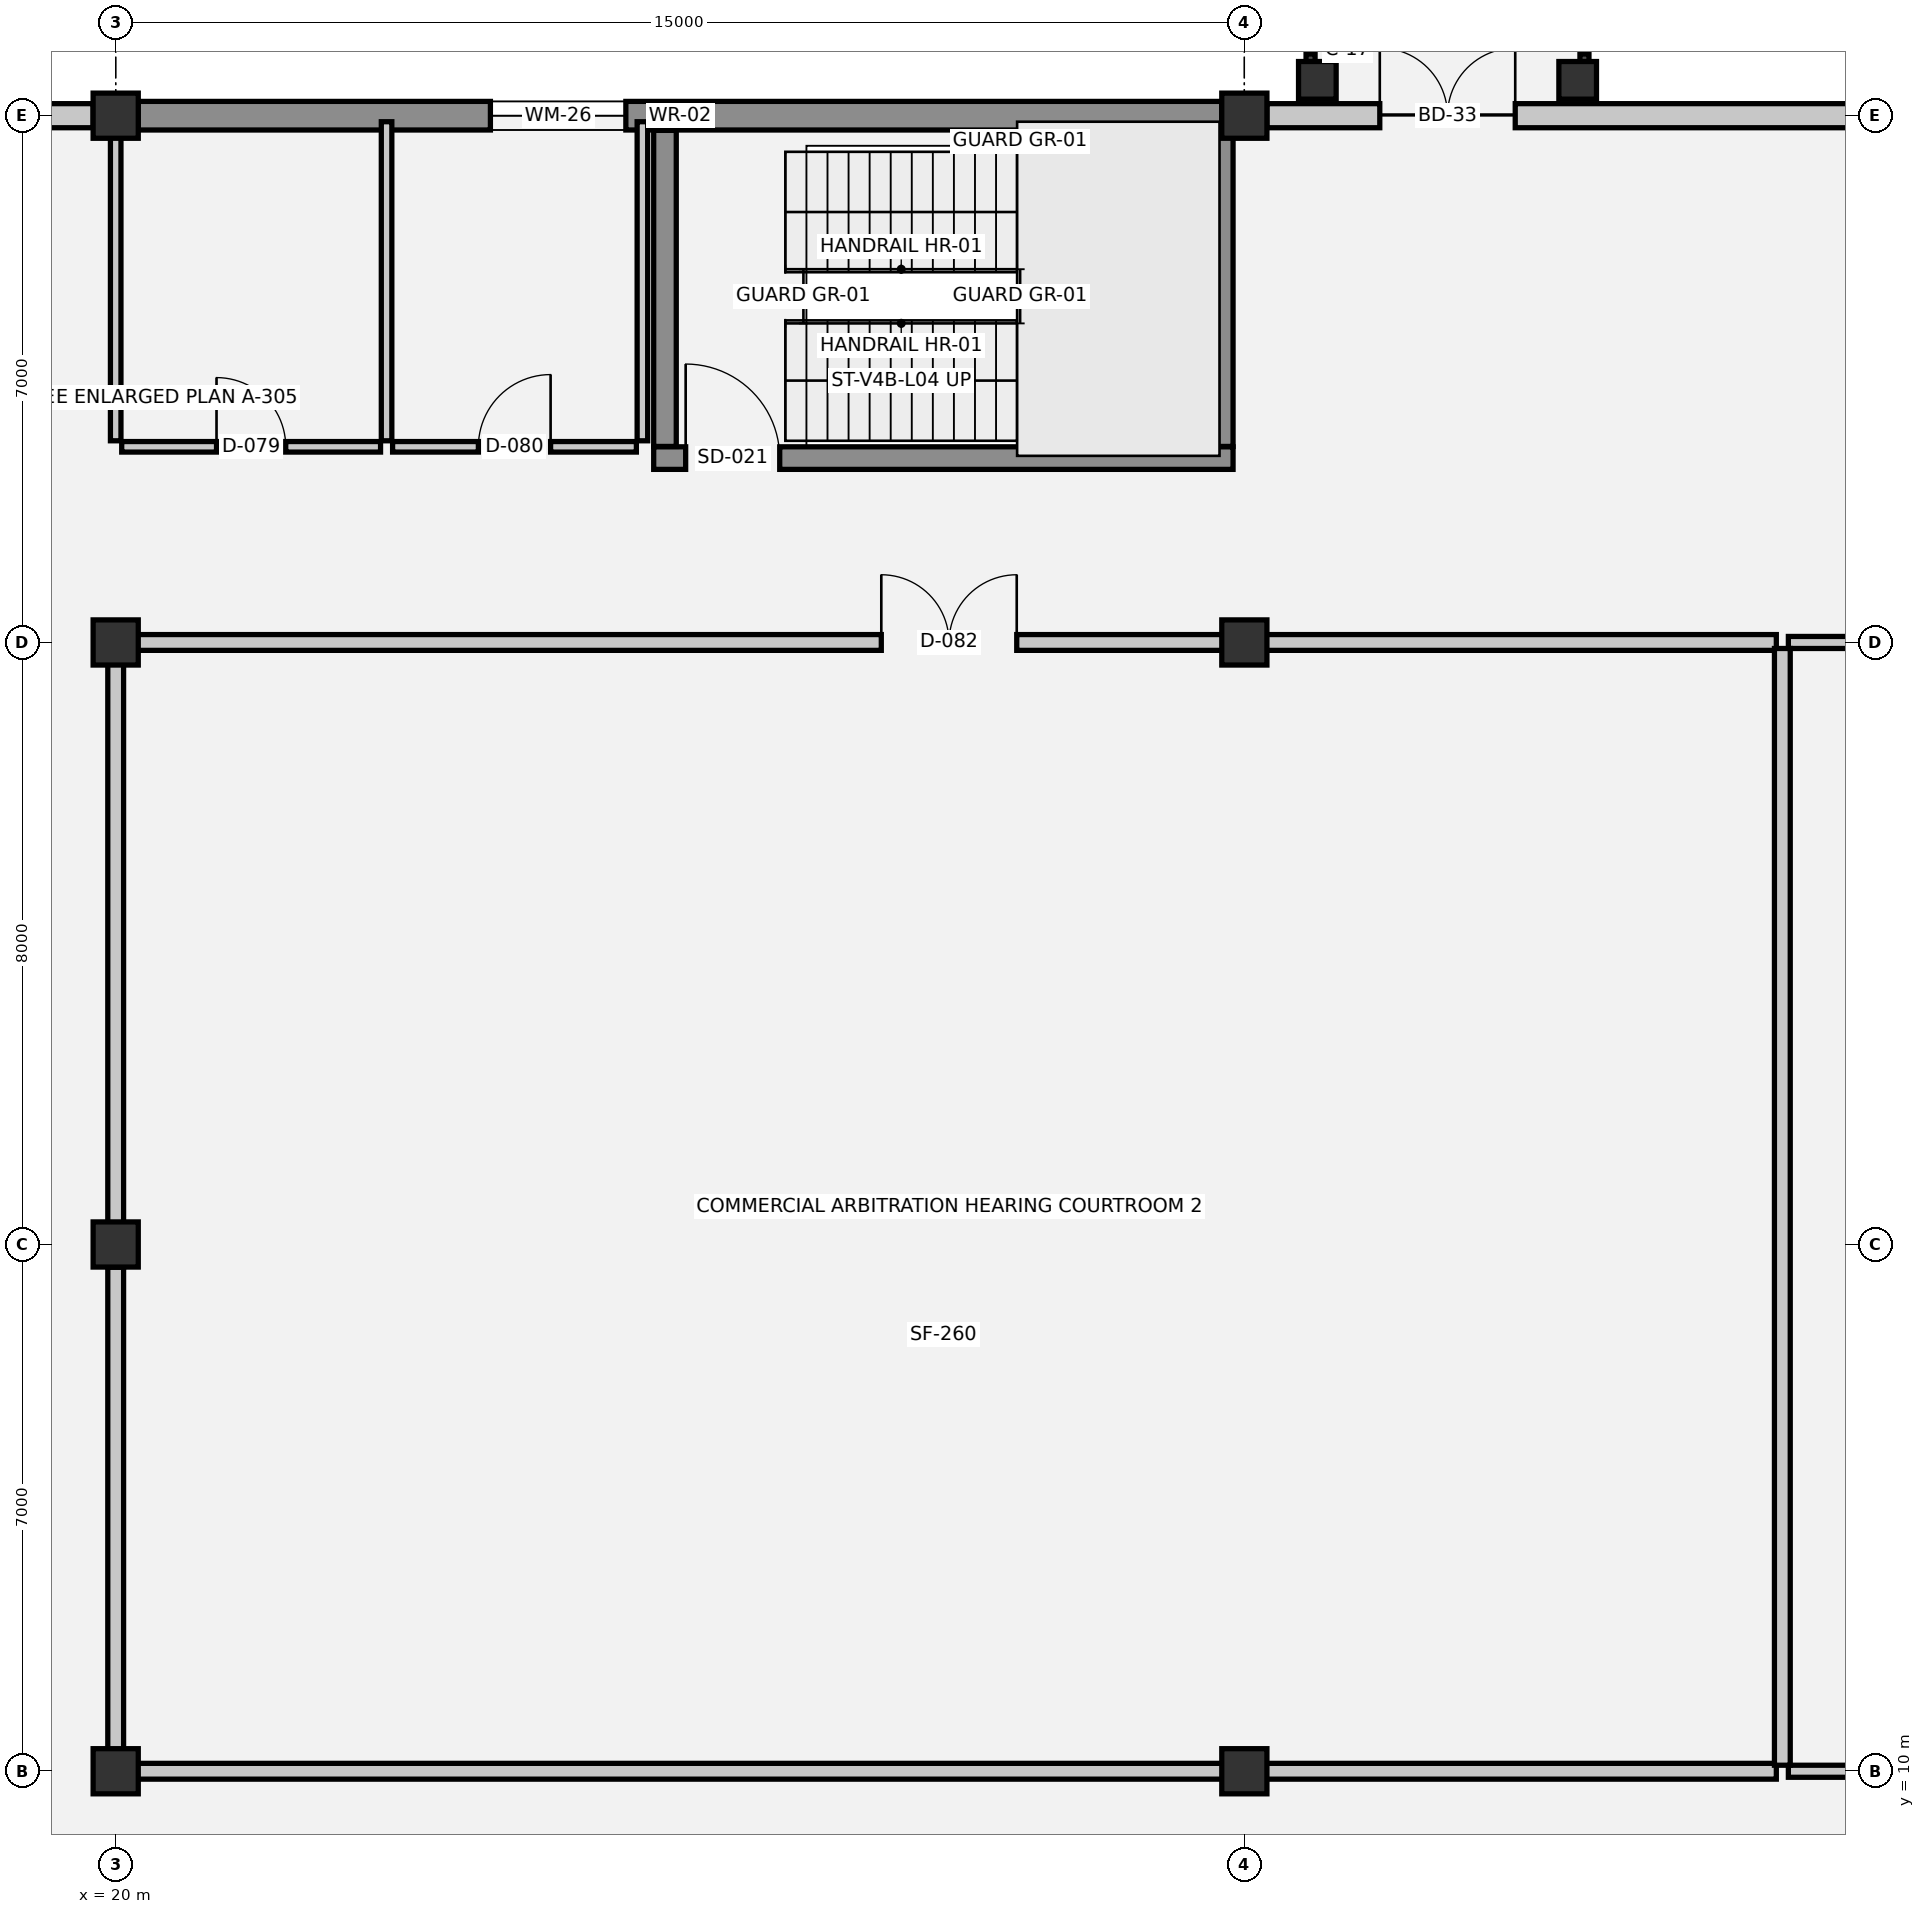
"""IFC4 building model, lengths in metres.
Left out: names, types, materials, properties, quantities, classifications, styles, units other than length and angle.
Written with IfcOpenShell. Run it as: python <this file> out.ifc"""

import sys

from ifc_helpers import new_model, si_unit, direction, frame, frame_2d, origin, origin_2d, place, context, subcontext, project, spatial, rectangle, extrude, element, fill, save


model = new_model("IFC4")
c1 = context("Model", 3, precision=1e-05, world=origin(), true_north=direction((0.0, 1.0)))
c2 = subcontext(c1, "Body", "Model", "MODEL_VIEW")
j1 = project(units=[si_unit("LENGTHUNIT", "METRE"), si_unit("PLANEANGLEUNIT", "RADIAN")], contexts=[c1])
p1 = place(None, origin())
s1 = spatial("IfcSite", under=j1, at=p1, CompositionType="ELEMENT")
p2 = place(p1, origin())
s2 = spatial("IfcBuilding", under=s1, at=p2, CompositionType="ELEMENT")
p3 = place(p2, frame((0.0, 0.0, 14.4)))
s3 = spatial("IfcBuildingStorey", under=s2, at=p3, CompositionType="ELEMENT", Elevation=14.4)
for number, where, z_axis, x_axis in (
    (1, (20.0, 10.0, 0.0), (0.0, 0.0, 1.0), (1.0, 0.0, 0.0)),
    (2, (20.0, 17.0, 0.0), (0.0, 0.0, 1.0), (1.0, 0.0, 0.0)),
    (3, (20.0, 25.0, 0.0), (0.0, 0.0, 1.0), (1.0, 0.0, 0.0)),
    (4, (20.0, 32.0, 0.0), (0.0, 0.0, 1.0), (1.0, 0.0, 0.0)),
    (5, (35.0, 10.0, 0.0), (0.0, 0.0, 1.0), (1.0, 0.0, 0.0)),
    (6, (35.0, 25.0, 0.0), (0.0, 0.0, 1.0), (1.0, 0.0, 0.0)),
    (7, (35.0, 32.0, 0.0), (0.0, 0.0, 1.0), (1.0, 0.0, 0.0)),
):
    element("IfcColumn", number, at=place(p3, frame(where, z_axis=z_axis, x_axis=x_axis)), inside=s3, PredefinedType="COLUMN", context=c2, shape_type="SweptSolid", body=[
        extrude(rectangle(XDim=0.6, YDim=0.6, at=origin_2d()), origin(), (0.0, 0.0, 1.0), 3.9),
    ])
for number, where, z_axis, x_axis in (
    (8, (35.97, 32.47, 0.0), (0.0, 0.0, 1.0), (1.0, 0.0, 0.0)),
    (9, (39.43, 32.47, 0.0), (0.0, 0.0, 1.0), (1.0, 0.0, 0.0)),
):
    element("IfcColumn", number, at=place(p3, frame(where, z_axis=z_axis, x_axis=x_axis)), inside=s3, PredefinedType="COLUMN", context=c2, shape_type="SweptSolid", body=[
        extrude(rectangle(XDim=0.5, YDim=0.5, at=origin_2d()), origin(), (0.0, 0.0, 1.0), 3.67),
    ])
p4 = place(p3, frame((14.8, 32.0, 0.0), z_axis=(0.0, 0.0, 1.0), x_axis=(1.0, 0.0, 0.0)))
e10 = element("IfcWall", 10, at=p4, inside=s3, PredefinedType="SOLIDWALL", context=c2, shape_type="SweptSolid", body=[
    extrude(rectangle(XDim=4.9, YDim=0.32, at=frame_2d((2.45, 0.0))), origin(), (0.0, 0.0, 1.0), 2.61),
])
p5 = place(p4, frame((1.35, 0.0, 0.9)))
e11 = element("IfcOpeningElement", 11, at=p5, cuts=e10, PredefinedType="OPENING", context=c2, shape_type="SweptSolid", body=[
    extrude(rectangle(XDim=2.2, YDim=1.0, at=frame_2d((1.1, 0.5))), frame((0.0, 0.17, 0.0), z_axis=(0.0, -1.0, 0.0), x_axis=(1.0, 0.0, 0.0)), (0.0, 0.0, 1.0), 0.34),
])
p6 = place(p3, frame((20.3, 32.0, 0.0), z_axis=(0.0, 0.0, 1.0), x_axis=(1.0, 0.0, 0.0)))
e12 = element("IfcWall", 12, at=p6, inside=s3, PredefinedType="STANDARD", context=c2, shape_type="SweptSolid", body=[
    extrude(rectangle(XDim=14.4, YDim=0.38, at=frame_2d((7.2, 0.0))), origin(), (0.0, 0.0, 1.0), 2.61),
])
p7 = place(p6, frame((4.68, 0.0, 0.95)))
e13 = element("IfcOpeningElement", 13, at=p7, cuts=e12, PredefinedType="OPENING", context=c2, shape_type="SweptSolid", body=[
    extrude(rectangle(XDim=1.8, YDim=1.35, at=frame_2d((0.9, 0.675))), frame((0.0, 0.2, 0.0), z_axis=(0.0, -1.0, 0.0), x_axis=(1.0, 0.0, 0.0)), (0.0, 0.0, 1.0), 0.4),
])
p8 = place(p3, frame((35.3, 32.0, 0.0), z_axis=(0.0, 0.0, 1.0), x_axis=(1.0, 0.0, 0.0)))
e14 = element("IfcWall", 14, at=p8, inside=s3, PredefinedType="SOLIDWALL", context=c2, shape_type="SweptSolid", body=[
    extrude(rectangle(XDim=14.4, YDim=0.32, at=frame_2d((7.2, 0.0))), origin(), (0.0, 0.0, 1.0), 2.61),
])
p9 = place(p8, frame((1.5, 0.0, 0.0)))
e15 = element("IfcOpeningElement", 15, at=p9, cuts=e14, PredefinedType="OPENING", context=c2, shape_type="SweptSolid", body=[
    extrude(rectangle(XDim=1.8, YDim=2.25, at=frame_2d((0.9, 1.125))), frame((0.0, 0.17, 0.0), z_axis=(0.0, -1.0, 0.0), x_axis=(1.0, 0.0, 0.0)), (0.0, 0.0, 1.0), 0.34),
])
p10 = place(p3, frame((27.15, 27.45, 0.0), z_axis=(0.0, 0.0, 1.0), x_axis=(1.0, 0.0, 0.0)))
e16 = element("IfcWall", 16, at=p10, inside=s3, PredefinedType="SHEAR", context=c2, shape_type="SweptSolid", body=[
    extrude(rectangle(XDim=7.7, YDim=0.3, at=frame_2d((3.85, 0.0))), origin(), (0.0, 0.0, 1.0), 3.64),
])
p11 = place(p10, frame((0.425, 0.0, 0.0)))
e17 = element("IfcOpeningElement", 17, at=p11, cuts=e16, PredefinedType="OPENING", context=c2, shape_type="SweptSolid", body=[
    extrude(rectangle(XDim=1.25, YDim=2.15, at=frame_2d((0.625, 1.075))), frame((0.0, 0.16, 0.0), z_axis=(0.0, -1.0, 0.0), x_axis=(1.0, 0.0, 0.0)), (0.0, 0.0, 1.0), 0.32),
])
for number, where, z_axis, x_axis in (
    (18, (27.3, 31.805, 0.0), (0.0, 0.0, 1.0), (0.0, -1.0, 0.0)),
    (19, (34.7, 27.605, 0.0), (0.0, 0.0, 1.0), (0.0, 1.0, 0.0)),
):
    element("IfcWall", number, at=place(p3, frame(where, z_axis=z_axis, x_axis=x_axis)), inside=s3, PredefinedType="SHEAR", context=c2, shape_type="SweptSolid", body=[
        extrude(rectangle(XDim=4.2, YDim=0.3, at=frame_2d((2.1, 0.0))), origin(), (0.0, 0.0, 1.0), 3.64),
    ])
p12 = place(p3, frame((20.08, 10.0, 0.0), z_axis=(0.0, 0.0, 1.0), x_axis=(1.0, 0.0, 0.0)))
e20 = element("IfcWall", 20, at=p12, inside=s3, PredefinedType="PARTITIONING", context=c2, shape_type="SweptSolid", body=[
    extrude(rectangle(XDim=21.99, YDim=0.21, at=frame_2d((10.995, 0.0))), origin(), (0.0, 0.0, 1.0), 2.63),
])
p13 = place(p3, frame((42.23, 10.0, 0.0), z_axis=(0.0, 0.0, 1.0), x_axis=(1.0, 0.0, 0.0)))
e21 = element("IfcWall", 21, at=p13, inside=s3, PredefinedType="PARTITIONING", context=c2, shape_type="SweptSolid", body=[
    extrude(rectangle(XDim=8.07, YDim=0.16, at=frame_2d((4.035, 0.0))), origin(), (0.0, 0.0, 1.0), 2.63),
])
p14 = place(p3, frame((20.08, 25.0, 0.0), z_axis=(0.0, 0.0, 1.0), x_axis=(1.0, 0.0, 0.0)))
e22 = element("IfcWall", 22, at=p14, inside=s3, PredefinedType="PARTITIONING", context=c2, shape_type="SweptSolid", body=[
    extrude(rectangle(XDim=21.99, YDim=0.21, at=frame_2d((10.995, 0.0))), origin(), (0.0, 0.0, 1.0), 2.63),
])
p15 = place(p14, frame((10.095, 0.0, 0.0)))
e23 = element("IfcOpeningElement", 23, at=p15, cuts=e22, PredefinedType="OPENING", context=c2, shape_type="SweptSolid", body=[
    extrude(rectangle(XDim=1.8, YDim=2.3, at=frame_2d((0.9, 1.15))), frame((0.0, 0.115, 0.0), z_axis=(0.0, -1.0, 0.0), x_axis=(1.0, 0.0, 0.0)), (0.0, 0.0, 1.0), 0.23),
])
p16 = place(p3, frame((42.23, 25.0, 0.0), z_axis=(0.0, 0.0, 1.0), x_axis=(1.0, 0.0, 0.0)))
e24 = element("IfcWall", 24, at=p16, inside=s3, PredefinedType="PARTITIONING", context=c2, shape_type="SweptSolid", body=[
    extrude(rectangle(XDim=8.07, YDim=0.16, at=frame_2d((4.035, 0.0))), origin(), (0.0, 0.0, 1.0), 2.63),
])
p17 = place(p16, frame((4.504, 0.0, 0.0)))
e25 = element("IfcOpeningElement", 25, at=p17, cuts=e24, PredefinedType="OPENING", context=c2, shape_type="SweptSolid", body=[
    extrude(rectangle(XDim=1.12, YDim=2.2, at=frame_2d((0.56, 1.1))), frame((0.0, 0.09, 0.0), z_axis=(0.0, -1.0, 0.0), x_axis=(1.0, 0.0, 0.0)), (0.0, 0.0, 1.0), 0.18),
])
p18 = place(p3, frame((20.08, 27.6, 0.0), z_axis=(0.0, 0.0, 1.0), x_axis=(1.0, 0.0, 0.0)))
e26 = element("IfcWall", 26, at=p18, inside=s3, PredefinedType="PLUMBINGWALL", context=c2, shape_type="SweptSolid", body=[
    extrude(rectangle(XDim=3.44, YDim=0.14, at=frame_2d((1.72, 0.0))), origin(), (0.0, 0.0, 1.0), 3.54),
])
p19 = place(p18, frame((1.26, 0.0, 0.0)))
e27 = element("IfcOpeningElement", 27, at=p19, cuts=e26, PredefinedType="OPENING", context=c2, shape_type="SweptSolid", body=[
    extrude(rectangle(XDim=0.92, YDim=2.1, at=frame_2d((0.46, 1.05))), frame((0.0, 0.08, 0.0), z_axis=(0.0, -1.0, 0.0), x_axis=(1.0, 0.0, 0.0)), (0.0, 0.0, 1.0), 0.16),
])
p20 = place(p3, frame((23.68, 27.6, 0.0), z_axis=(0.0, 0.0, 1.0), x_axis=(1.0, 0.0, 0.0)))
e28 = element("IfcWall", 28, at=p20, inside=s3, PredefinedType="PLUMBINGWALL", context=c2, shape_type="SweptSolid", body=[
    extrude(rectangle(XDim=3.24, YDim=0.14, at=frame_2d((1.62, 0.0))), origin(), (0.0, 0.0, 1.0), 3.54),
])
p21 = place(p20, frame((1.14, 0.0, 0.0)))
e29 = element("IfcOpeningElement", 29, at=p21, cuts=e28, PredefinedType="OPENING", context=c2, shape_type="SweptSolid", body=[
    extrude(rectangle(XDim=0.96, YDim=2.1, at=frame_2d((0.48, 1.05))), frame((0.0, 0.08, 0.0), z_axis=(0.0, -1.0, 0.0), x_axis=(1.0, 0.0, 0.0)), (0.0, 0.0, 1.0), 0.16),
])
p22 = place(p3, frame((20.0, 10.08, 0.0), z_axis=(0.0, 0.0, 1.0), x_axis=(0.0, 1.0, 0.0)))
e30 = element("IfcWall", 30, at=p22, inside=s3, PredefinedType="PARTITIONING", context=c2, shape_type="SweptSolid", body=[
    extrude(rectangle(XDim=6.62, YDim=0.21, at=frame_2d((3.31, 0.0))), origin(), (0.0, 0.0, 1.0), 3.03),
])
p23 = place(p3, frame((20.0, 16.7, 0.0), z_axis=(0.0, 0.0, 1.0), x_axis=(0.0, 1.0, 0.0)))
e31 = element("IfcWall", 31, at=p23, inside=s3, PredefinedType="PARTITIONING", context=c2, shape_type="SweptSolid", body=[
    extrude(rectangle(XDim=8.22, YDim=0.21, at=frame_2d((4.11, 0.0))), origin(), (0.0, 0.0, 1.0), 2.88),
])
p24 = place(p3, frame((20.0, 27.68, 0.0), z_axis=(0.0, 0.0, 1.0), x_axis=(0.0, 1.0, 0.0)))
e32 = element("IfcWall", 32, at=p24, inside=s3, PredefinedType="PLUMBINGWALL", context=c2, shape_type="SweptSolid", body=[
    extrude(rectangle(XDim=4.24, YDim=0.14, at=frame_2d((2.12, 0.0))), origin(), (0.0, 0.0, 1.0), 3.03),
])
for number, where, z_axis, x_axis in (
    (33, (23.6, 27.68, 0.0), (0.0, 0.0, 1.0), (0.0, 1.0, 0.0)),
    (34, (27.0, 27.68, 0.0), (0.0, 0.0, 1.0), (0.0, 1.0, 0.0)),
):
    element("IfcWall", number, at=place(p3, frame(where, z_axis=z_axis, x_axis=x_axis)), inside=s3, PredefinedType="PLUMBINGWALL", context=c2, shape_type="SweptSolid", body=[
        extrude(rectangle(XDim=4.24, YDim=0.14, at=frame_2d((2.12, 0.0))), origin(), (0.0, 0.0, 1.0), 3.54),
    ])
p25 = place(p3, frame((42.15, 10.08, 0.0), z_axis=(0.0, 0.0, 1.0), x_axis=(0.0, 1.0, 0.0)))
e35 = element("IfcWall", 35, at=p25, inside=s3, PredefinedType="PARTITIONING", context=c2, shape_type="SweptSolid", body=[
    extrude(rectangle(XDim=14.84, YDim=0.21, at=frame_2d((7.42, 0.0))), origin(), (0.0, 0.0, 1.0), 3.54),
])
p26 = place(p9, origin())
e36 = element("IfcDoor", 36, at=p26, inside=s3, OperationType="DOUBLE_DOOR_SINGLE_SWING", PredefinedType="DOOR", context=c2, shape_type="SweptSolid", body=[
    extrude(rectangle(XDim=1.8, YDim=2.25, at=frame_2d((0.9, 1.125))), frame((0.0, 0.025, 0.0), z_axis=(0.0, -1.0, 0.0), x_axis=(1.0, 0.0, 0.0)), (0.0, 0.0, 1.0), 0.05),
])
fill(e15, e36)
p27 = place(p11, origin())
e37 = element("IfcDoor", 37, at=p27, inside=s3, OperationType="SINGLE_SWING_LEFT", PredefinedType="DOOR", context=c2, shape_type="SweptSolid", body=[
    extrude(rectangle(XDim=1.25, YDim=2.15, at=frame_2d((0.625, 1.075))), frame((0.0, 0.025, 0.0), z_axis=(0.0, -1.0, 0.0), x_axis=(1.0, 0.0, 0.0)), (0.0, 0.0, 1.0), 0.05),
])
fill(e17, e37)
p28 = place(p19, origin())
e38 = element("IfcDoor", 38, at=p28, inside=s3, OperationType="SINGLE_SWING_LEFT", PredefinedType="DOOR", context=c2, shape_type="SweptSolid", body=[
    extrude(rectangle(XDim=0.92, YDim=2.1, at=frame_2d((0.46, 1.05))), frame((0.0, 0.025, 0.0), z_axis=(0.0, -1.0, 0.0), x_axis=(1.0, 0.0, 0.0)), (0.0, 0.0, 1.0), 0.05),
])
fill(e27, e38)
p29 = place(p21, origin())
e39 = element("IfcDoor", 39, at=p29, inside=s3, OperationType="SINGLE_SWING_RIGHT", PredefinedType="DOOR", context=c2, shape_type="SweptSolid", body=[
    extrude(rectangle(XDim=0.96, YDim=2.1, at=frame_2d((0.48, 1.05))), frame((0.0, 0.025, 0.0), z_axis=(0.0, -1.0, 0.0), x_axis=(1.0, 0.0, 0.0)), (0.0, 0.0, 1.0), 0.05),
])
fill(e29, e39)
p30 = place(p15, origin())
e40 = element("IfcDoor", 40, at=p30, inside=s3, OperationType="DOUBLE_DOOR_SINGLE_SWING", PredefinedType="DOOR", context=c2, shape_type="SweptSolid", body=[
    extrude(rectangle(XDim=1.8, YDim=2.3, at=frame_2d((0.9, 1.15))), frame((0.0, 0.025, 0.0), z_axis=(0.0, -1.0, 0.0), x_axis=(1.0, 0.0, 0.0)), (0.0, 0.0, 1.0), 0.05),
])
fill(e23, e40)
p31 = place(p7, origin())
e41 = element("IfcWindow", 41, at=p31, inside=s3, PartitioningType="SINGLE_PANEL", PredefinedType="WINDOW", context=c2, shape_type="SweptSolid", body=[
    extrude(rectangle(XDim=1.8, YDim=1.35, at=frame_2d((0.9, 0.675))), frame((0.0, 0.03, 0.0), z_axis=(0.0, -1.0, 0.0), x_axis=(1.0, 0.0, 0.0)), (0.0, 0.0, 1.0), 0.06),
])
fill(e13, e41)
save(model, sys.argv[1])
